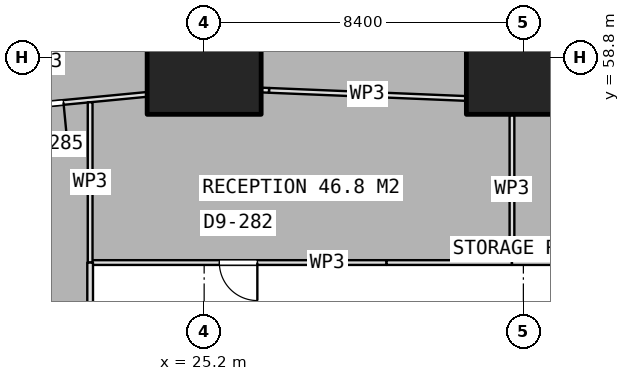
"""IFC4 building model, lengths in metres.
Left out: names, types, materials, properties, quantities, classifications, styles, units other than length and angle.
Written with IfcOpenShell. Run it as: python <this file> out.ifc"""

import sys

from ifc_helpers import new_model, si_unit, direction, frame, frame_2d, origin, origin_2d, place, context, subcontext, project, spatial, rectangle, extrude, element, fill, save


model = new_model("IFC4")
c1 = context("Model", 3, precision=1e-05, world=origin(), true_north=direction((0.0, 1.0)))
c2 = subcontext(c1, "Body", "Model", "MODEL_VIEW")
j1 = project(units=[si_unit("LENGTHUNIT", "METRE"), si_unit("PLANEANGLEUNIT", "RADIAN")], contexts=[c1])
p1 = place(None, origin())
s1 = spatial("IfcSite", under=j1, at=p1, CompositionType="ELEMENT")
p2 = place(p1, origin())
s2 = spatial("IfcBuilding", under=s1, at=p2, CompositionType="ELEMENT")
p3 = place(p2, frame((0.0, 0.0, 77.9)))
s3 = spatial("IfcBuildingStorey", under=s2, at=p3, CompositionType="ELEMENT", Elevation=77.9)
for number, where, z_axis, x_axis in (
    (1, (25.2, 58.8, 0.0), (0.0, 0.0, 1.0), (1.0, 0.0, 0.0)),
    (2, (33.6, 58.8, 0.0), (0.0, 0.0, 1.0), (1.0, 0.0, 0.0)),
):
    element("IfcColumn", number, at=place(p3, frame(where, z_axis=z_axis, x_axis=x_axis)), inside=s3, PredefinedType="COLUMN", context=c2, shape_type="SweptSolid", body=[
        extrude(rectangle(XDim=3.0, YDim=3.0, at=origin_2d()), origin(), (0.0, 0.0, 1.0), 3.75),
    ])
p4 = place(p3, frame((32.08, 57.718, 0.0), z_axis=(0.0, 0.0, 1.0), x_axis=(-0.99915427175, 0.041118624049, 0.0)))
e3 = element("IfcWall", 3, at=p4, inside=s3, PredefinedType="PARTITIONING", context=c2, shape_type="SweptSolid", body=[
    extrude(rectangle(XDim=5.177, YDim=0.125, at=frame_2d((2.589, 0.0))), origin(), (0.0, 0.0, 1.0), 3.5),
])
p5 = place(p3, frame((23.68, 57.823, 0.0), z_axis=(0.0, 0.0, 1.0), x_axis=(-0.995395894547, -0.095848907765, 0.0)))
e4 = element("IfcWall", 4, at=p5, inside=s3, PredefinedType="PARTITIONING", context=c2, shape_type="SweptSolid", body=[
    extrude(rectangle(XDim=5.385, YDim=0.125, at=frame_2d((2.692, 0.0))), origin(), (0.0, 0.0, 1.0), 3.5),
])
p6 = place(p5, frame((2.192, 0.0, 0.0)))
e5 = element("IfcOpeningElement", 5, at=p6, cuts=e4, PredefinedType="OPENING", context=c2, shape_type="SweptSolid", body=[
    extrude(rectangle(XDim=1.0, YDim=2.1, at=frame_2d((0.5, 1.05))), frame((0.0, 0.073, 0.0), z_axis=(0.0, -1.0, 0.0), x_axis=(1.0, 0.0, 0.0)), (0.0, 0.0, 1.0), 0.145),
])
p7 = place(p3, frame((26.72, 57.939, 0.0), z_axis=(0.0, 0.0, 1.0), x_axis=(0.999073306043, -0.043041017101, 0.0)))
e6 = element("IfcWall", 6, at=p7, inside=s3, PredefinedType="PARTITIONING", context=c2, shape_type="SweptSolid", body=[
    extrude(rectangle(XDim=0.187, YDim=0.125, at=frame_2d((0.094, 0.0))), origin(), (0.0, 0.0, 1.0), 3.5),
])
p8 = place(p3, frame((30.0, 53.4, 0.0), z_axis=(0.0, 0.0, 1.0), x_axis=(-1.0, 0.0, 0.0)))
e7 = element("IfcWall", 7, at=p8, inside=s3, PredefinedType="PARTITIONING", context=c2, shape_type="SweptSolid", body=[
    extrude(rectangle(XDim=7.8, YDim=0.125, at=frame_2d((3.9, 0.0))), origin(), (0.0, 0.0, 1.0), 3.5),
])
p9 = place(p8, frame((3.4, 0.0, 0.0)))
e8 = element("IfcOpeningElement", 8, at=p9, cuts=e7, PredefinedType="OPENING", context=c2, shape_type="SweptSolid", body=[
    extrude(rectangle(XDim=1.0, YDim=2.1, at=frame_2d((0.5, 1.05))), frame((0.0, 0.073, 0.0), z_axis=(0.0, -1.0, 0.0), x_axis=(1.0, 0.0, 0.0)), (0.0, 0.0, 1.0), 0.145),
])
p10 = place(p3, frame((22.2, 53.4, 0.0), z_axis=(0.0, 0.0, 1.0), x_axis=(0.0, 1.0, 0.0)))
e9 = element("IfcWall", 9, at=p10, inside=s3, PredefinedType="PARTITIONING", context=c2, shape_type="SweptSolid", body=[
    extrude(rectangle(XDim=4.218, YDim=0.125, at=frame_2d((2.109, 0.0))), origin(), (0.0, 0.0, 1.0), 3.5),
])
p11 = place(p3, frame((33.3, 57.28, 0.0), z_axis=(0.0, 0.0, 1.0), x_axis=(0.0, -1.0, 0.0)))
e10 = element("IfcWall", 10, at=p11, inside=s3, PredefinedType="PARTITIONING", context=c2, shape_type="SweptSolid", body=[
    extrude(rectangle(XDim=3.88, YDim=0.125, at=frame_2d((1.94, 0.0))), origin(), (0.0, 0.0, 1.0), 3.5),
])
p12 = place(p3, frame((33.3, 53.4, 0.0), z_axis=(0.0, 0.0, 1.0), x_axis=(-1.0, 0.0, 0.0)))
e11 = element("IfcWall", 11, at=p12, inside=s3, PredefinedType="PARTITIONING", context=c2, shape_type="SweptSolid", body=[
    extrude(rectangle(XDim=3.3, YDim=0.125, at=frame_2d((1.65, 0.0))), origin(), (0.0, 0.0, 1.0), 3.5),
])
p13 = place(p3, frame((36.3, 53.4, 0.0), z_axis=(0.0, 0.0, 1.0), x_axis=(-1.0, 0.0, 0.0)))
e12 = element("IfcWall", 12, at=p13, inside=s3, PredefinedType="PARTITIONING", context=c2, shape_type="SweptSolid", body=[
    extrude(rectangle(XDim=3.0, YDim=0.125, at=frame_2d((1.5, 0.0))), origin(), (0.0, 0.0, 1.0), 3.5),
])
p14 = place(p3, frame((22.2, 53.4, 0.0), z_axis=(0.0, 0.0, 1.0), x_axis=(0.0, -1.0, 0.0)))
e13 = element("IfcWall", 13, at=p14, inside=s3, PredefinedType="PARTITIONING", context=c2, shape_type="SweptSolid", body=[
    extrude(rectangle(XDim=7.989, YDim=0.15, at=frame_2d((3.995, 0.0))), origin(), (0.0, 0.0, 1.0), 3.5),
])
p15 = place(p14, frame((3.494, 0.0, 0.0)))
e14 = element("IfcOpeningElement", 14, at=p15, cuts=e13, PredefinedType="OPENING", context=c2, shape_type="SweptSolid", body=[
    extrude(rectangle(XDim=1.0, YDim=2.1, at=frame_2d((0.5, 1.05))), frame((0.0, 0.085, 0.0), z_axis=(0.0, -1.0, 0.0), x_axis=(1.0, 0.0, 0.0)), (0.0, 0.0, 1.0), 0.17),
])
p16 = place(p6, origin())
e15 = element("IfcDoor", 15, at=p16, inside=s3, OperationType="SINGLE_SWING_LEFT", PredefinedType="DOOR", context=c2, shape_type="SweptSolid", body=[
    extrude(rectangle(XDim=1.0, YDim=2.1, at=frame_2d((0.5, 1.05))), frame((0.0, 0.025, 0.0), z_axis=(0.0, -1.0, 0.0), x_axis=(1.0, 0.0, 0.0)), (0.0, 0.0, 1.0), 0.05),
])
fill(e5, e15)
p17 = place(p9, origin())
e16 = element("IfcDoor", 16, at=p17, inside=s3, OperationType="SINGLE_SWING_LEFT", PredefinedType="DOOR", context=c2, shape_type="SweptSolid", body=[
    extrude(rectangle(XDim=1.0, YDim=2.1, at=frame_2d((0.5, 1.05))), frame((0.0, 0.025, 0.0), z_axis=(0.0, -1.0, 0.0), x_axis=(1.0, 0.0, 0.0)), (0.0, 0.0, 1.0), 0.05),
])
fill(e8, e16)
save(model, sys.argv[1])
